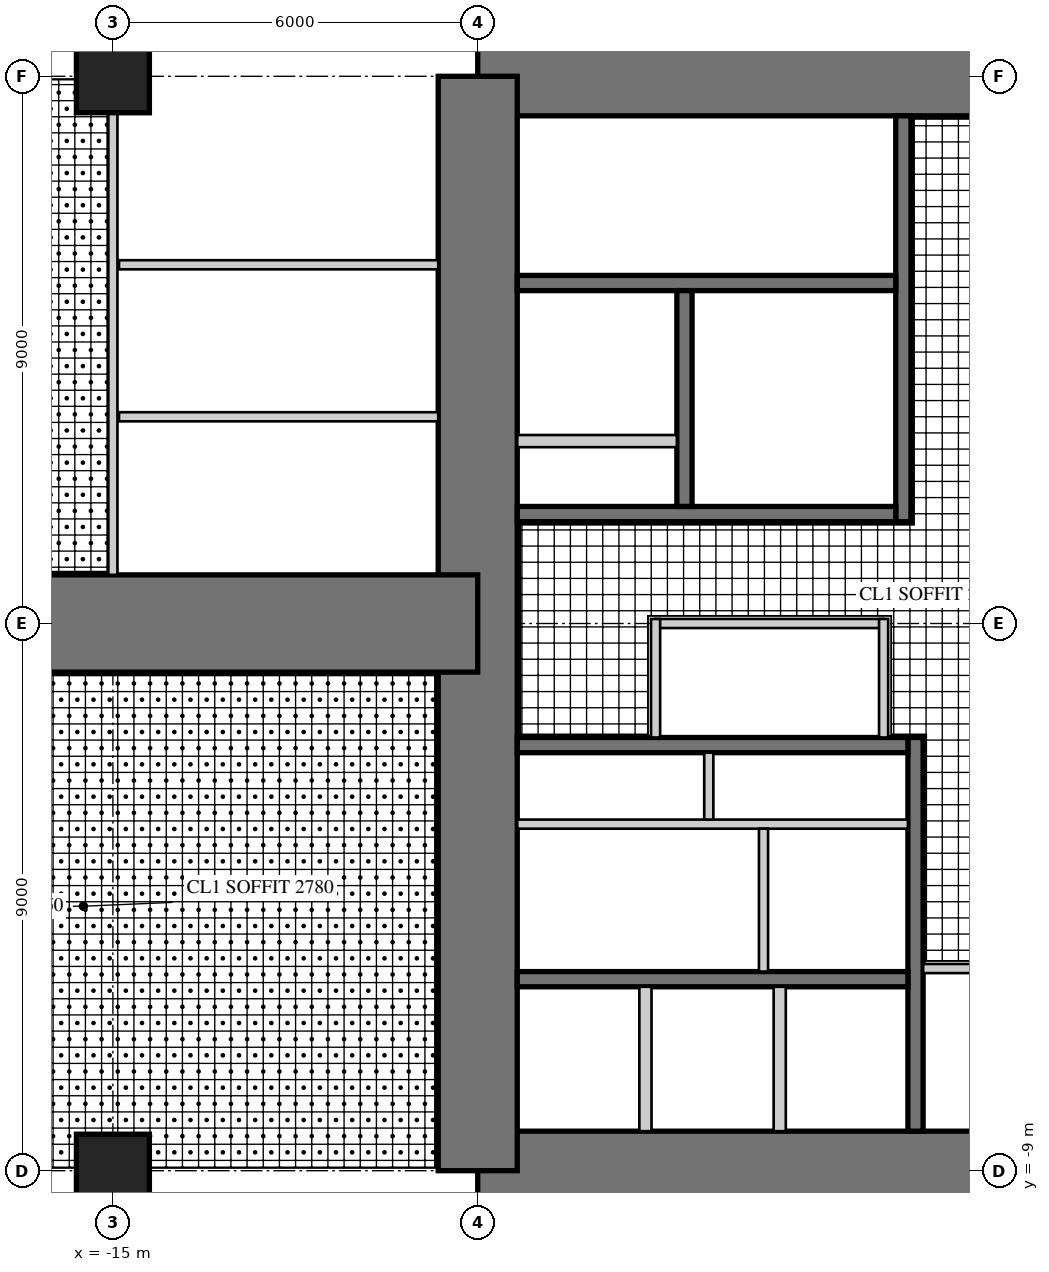
"""IFC4 building model, lengths in metres.
Left out: names, types, materials, properties, quantities, classifications, styles, units other than length and angle.
Written with IfcOpenShell. Run it as: python <this file> out.ifc"""

import sys

from ifc_helpers import new_model, si_unit, direction, frame, frame_2d, origin, origin_2d, place, context, subcontext, project, spatial, rectangle, extrude, element, fill, save


model = new_model("IFC4")
c1 = context("Model", 3, precision=1e-05, world=origin(), true_north=direction((0.0, 1.0)))
c2 = subcontext(c1, "Body", "Model", "MODEL_VIEW")
j1 = project(units=[si_unit("LENGTHUNIT", "METRE"), si_unit("PLANEANGLEUNIT", "RADIAN")], contexts=[c1])
p1 = place(None, origin())
s1 = spatial("IfcSite", under=j1, at=p1, CompositionType="ELEMENT")
p2 = place(p1, origin())
s2 = spatial("IfcBuilding", under=s1, at=p2, CompositionType="ELEMENT")
p3 = place(p2, frame((0.0, 0.0, 27.5)))
s3 = spatial("IfcBuildingStorey", under=s2, at=p3, CompositionType="ELEMENT", Elevation=27.5)
p4 = place(p3, frame((9.0, 9.0, 0.0), z_axis=(0.0, 0.0, 1.0), x_axis=(-1.0, 0.0, 0.0)))
e1 = element("IfcWall", 1, at=p4, inside=s3, PredefinedType="SHEAR", context=c2, shape_type="SweptSolid", body=[
    extrude(rectangle(XDim=18.0, YDim=1.3, at=frame_2d((9.0, 0.0))), origin(), (0.0, 0.0, 1.0), 4.0),
])
p5 = place(p4, frame((9.8, 0.0, 0.0)))
e2 = element("IfcOpeningElement", 2, at=p5, cuts=e1, PredefinedType="OPENING", context=c2, shape_type="SweptSolid", body=[
    extrude(rectangle(XDim=1.0, YDim=2.4, at=frame_2d((0.5, 1.2))), frame((0.0, 0.66, 0.0), z_axis=(0.0, -1.0, 0.0), x_axis=(1.0, 0.0, 0.0)), (0.0, 0.0, 1.0), 1.32),
])
p6 = place(p3, frame((-9.0, -9.0, 0.0), z_axis=(0.0, 0.0, 1.0), x_axis=(1.0, 0.0, 0.0)))
e3 = element("IfcWall", 3, at=p6, inside=s3, PredefinedType="SHEAR", context=c2, shape_type="SweptSolid", body=[
    extrude(rectangle(XDim=18.0, YDim=1.3, at=frame_2d((9.0, 0.0))), origin(), (0.0, 0.0, 1.0), 4.0),
])
p7 = place(p6, frame((9.8, 0.0, 0.0)))
e4 = element("IfcOpeningElement", 4, at=p7, cuts=e3, PredefinedType="OPENING", context=c2, shape_type="SweptSolid", body=[
    extrude(rectangle(XDim=1.0, YDim=2.4, at=frame_2d((0.5, 1.2))), frame((0.0, 0.66, 0.0), z_axis=(0.0, -1.0, 0.0), x_axis=(1.0, 0.0, 0.0)), (0.0, 0.0, 1.0), 1.32),
])
p8 = place(p3, frame((-9.0, 9.0, 0.0), z_axis=(0.0, 0.0, 1.0), x_axis=(0.0, -1.0, 0.0)))
e5 = element("IfcWall", 5, at=p8, inside=s3, PredefinedType="SHEAR", context=c2, shape_type="SweptSolid", body=[
    extrude(rectangle(XDim=18.0, YDim=1.3, at=frame_2d((9.0, 0.0))), origin(), (0.0, 0.0, 1.0), 4.0),
])
p9 = place(p8, frame((9.8, 0.0, 0.0)))
e6 = element("IfcOpeningElement", 6, at=p9, cuts=e5, PredefinedType="OPENING", context=c2, shape_type="SweptSolid", body=[
    extrude(rectangle(XDim=1.0, YDim=2.4, at=frame_2d((0.5, 1.2))), frame((0.0, 0.66, 0.0), z_axis=(0.0, -1.0, 0.0), x_axis=(1.0, 0.0, 0.0)), (0.0, 0.0, 1.0), 1.32),
])
p10 = place(p3, frame((-2.0, 1.675, 0.0), z_axis=(0.0, 0.0, 1.0), x_axis=(0.0, 1.0, 0.0)))
e7 = element("IfcWall", 7, at=p10, inside=s3, PredefinedType="SHEAR", context=c2, shape_type="SweptSolid", body=[
    extrude(rectangle(XDim=6.675, YDim=0.25, at=frame_2d((3.337, 0.0))), origin(), (0.0, 0.0, 1.0), 4.0),
])
p11 = place(p10, frame((0.725, 0.0, 0.0)))
e8 = element("IfcOpeningElement", 8, at=p11, cuts=e7, PredefinedType="OPENING", context=c2, shape_type="SweptSolid", body=[
    extrude(rectangle(XDim=1.0, YDim=2.1, at=frame_2d((0.5, 1.05))), frame((0.0, 0.135, 0.0), z_axis=(0.0, -1.0, 0.0), x_axis=(1.0, 0.0, 0.0)), (0.0, 0.0, 1.0), 0.27),
])
p12 = place(p3, frame((-2.125, 1.8, 0.0), z_axis=(0.0, 0.0, 1.0), x_axis=(-1.0, 0.0, 0.0)))
e9 = element("IfcWall", 9, at=p12, inside=s3, PredefinedType="SHEAR", context=c2, shape_type="SweptSolid", body=[
    extrude(rectangle(XDim=6.225, YDim=0.25, at=frame_2d((3.113, 0.0))), origin(), (0.0, 0.0, 1.0), 4.0),
])
p13 = place(p3, frame((-2.125, 5.6, 0.0), z_axis=(0.0, 0.0, 1.0), x_axis=(-1.0, 0.0, 0.0)))
e10 = element("IfcWall", 10, at=p13, inside=s3, PredefinedType="SHEAR", context=c2, shape_type="SweptSolid", body=[
    extrude(rectangle(XDim=6.225, YDim=0.25, at=frame_2d((3.113, 0.0))), origin(), (0.0, 0.0, 1.0), 4.0),
])
p14 = place(p13, frame((0.175, 0.0, 0.0)))
e11 = element("IfcOpeningElement", 11, at=p14, cuts=e10, PredefinedType="OPENING", context=c2, shape_type="SweptSolid", body=[
    extrude(rectangle(XDim=1.0, YDim=2.1, at=frame_2d((0.5, 1.05))), frame((0.0, 0.135, 0.0), z_axis=(0.0, -1.0, 0.0), x_axis=(1.0, 0.0, 0.0)), (0.0, 0.0, 1.0), 0.27),
])
p15 = place(p3, frame((-5.6, 1.925, 0.0), z_axis=(0.0, 0.0, 1.0), x_axis=(0.0, 1.0, 0.0)))
e12 = element("IfcWall", 12, at=p15, inside=s3, PredefinedType="SHEAR", context=c2, shape_type="SweptSolid", body=[
    extrude(rectangle(XDim=3.55, YDim=0.25, at=frame_2d((1.775, 0.0))), origin(), (0.0, 0.0, 1.0), 4.0),
])
p16 = place(p15, frame((1.525, 0.0, 0.0)))
e13 = element("IfcOpeningElement", 13, at=p16, cuts=e12, PredefinedType="OPENING", context=c2, shape_type="SweptSolid", body=[
    extrude(rectangle(XDim=1.1, YDim=2.2, at=frame_2d((0.55, 1.1))), frame((0.0, 0.135, 0.0), z_axis=(0.0, -1.0, 0.0), x_axis=(1.0, 0.0, 0.0)), (0.0, 0.0, 1.0), 0.27),
])
p17 = place(p15, frame((0.075, 0.0, 0.0)))
e14 = element("IfcOpeningElement", 14, at=p17, cuts=e12, PredefinedType="OPENING", context=c2, shape_type="SweptSolid", body=[
    extrude(rectangle(XDim=0.8, YDim=2.1, at=frame_2d((0.4, 1.05))), frame((0.0, 0.135, 0.0), z_axis=(0.0, -1.0, 0.0), x_axis=(1.0, 0.0, 0.0)), (0.0, 0.0, 1.0), 0.27),
])
p18 = place(p3, frame((-5.725, 3.0, 0.0), z_axis=(0.0, 0.0, 1.0), x_axis=(-1.0, 0.0, 0.0)))
e15 = element("IfcWall", 15, at=p18, inside=s3, PredefinedType="PARTITIONING", context=c2, shape_type="SweptSolid", body=[
    extrude(rectangle(XDim=2.625, YDim=0.2, at=frame_2d((1.312, 0.0))), origin(), (0.0, 0.0, 1.0), 4.0),
])
p19 = place(p3, frame((-1.8, -1.875, 0.0), z_axis=(0.0, 0.0, 1.0), x_axis=(0.0, -1.0, 0.0)))
e16 = element("IfcWall", 16, at=p19, inside=s3, PredefinedType="SHEAR", context=c2, shape_type="SweptSolid", body=[
    extrude(rectangle(XDim=6.475, YDim=0.25, at=frame_2d((3.238, 0.0))), origin(), (0.0, 0.0, 1.0), 4.0),
])
p20 = place(p19, frame((1.875, 0.0, 0.0)))
e17 = element("IfcOpeningElement", 17, at=p20, cuts=e16, PredefinedType="OPENING", context=c2, shape_type="SweptSolid", body=[
    extrude(rectangle(XDim=1.6, YDim=2.4, at=frame_2d((0.8, 1.2))), frame((0.0, 0.135, 0.0), z_axis=(0.0, -1.0, 0.0), x_axis=(1.0, 0.0, 0.0)), (0.0, 0.0, 1.0), 0.27),
])
for number, where, z_axis, x_axis in (
    (18, (-1.925, -2.0, 0.0), (0.0, 0.0, 1.0), (-1.0, 0.0, 0.0)),
    (19, (-1.925, -5.85, 0.0), (0.0, 0.0, 1.0), (-1.0, 0.0, 0.0)),
):
    element("IfcWall", number, at=place(p3, frame(where, z_axis=z_axis, x_axis=x_axis)), inside=s3, PredefinedType="SHEAR", context=c2, shape_type="SweptSolid", body=[
        extrude(rectangle(XDim=6.425, YDim=0.25, at=frame_2d((3.212, 0.0))), origin(), (0.0, 0.0, 1.0), 4.0),
    ])
p21 = place(p3, frame((-1.925, -3.3, 0.0), z_axis=(0.0, 0.0, 1.0), x_axis=(-1.0, 0.0, 0.0)))
e20 = element("IfcWall", 20, at=p21, inside=s3, PredefinedType="PARTITIONING", context=c2, shape_type="SweptSolid", body=[
    extrude(rectangle(XDim=6.425, YDim=0.15, at=frame_2d((3.212, 0.0))), origin(), (0.0, 0.0, 1.0), 4.0),
])
p22 = place(p21, frame((0.075, 0.0, 0.0)))
e21 = element("IfcOpeningElement", 21, at=p22, cuts=e20, PredefinedType="OPENING", context=c2, shape_type="SweptSolid", body=[
    extrude(rectangle(XDim=0.8, YDim=2.1, at=frame_2d((0.4, 1.05))), frame((0.0, 0.085, 0.0), z_axis=(0.0, -1.0, 0.0), x_axis=(1.0, 0.0, 0.0)), (0.0, 0.0, 1.0), 0.17),
])
p23 = place(p21, frame((3.675, 0.0, 0.0)))
e22 = element("IfcOpeningElement", 22, at=p23, cuts=e20, PredefinedType="OPENING", context=c2, shape_type="SweptSolid", body=[
    extrude(rectangle(XDim=0.8, YDim=2.1, at=frame_2d((0.4, 1.05))), frame((0.0, 0.085, 0.0), z_axis=(0.0, -1.0, 0.0), x_axis=(1.0, 0.0, 0.0)), (0.0, 0.0, 1.0), 0.17),
])
p24 = place(p3, frame((-5.2, -2.125, 0.0), z_axis=(0.0, 0.0, 1.0), x_axis=(0.0, -1.0, 0.0)))
e23 = element("IfcWall", 23, at=p24, inside=s3, PredefinedType="PARTITIONING", context=c2, shape_type="SweptSolid", body=[
    extrude(rectangle(XDim=1.1, YDim=0.15, at=frame_2d((0.55, 0.0))), origin(), (0.0, 0.0, 1.0), 4.0),
])
for number, where, z_axis, x_axis in (
    (24, (-4.033, -5.975, 0.0), (0.0, 0.0, 1.0), (0.0, -1.0, 0.0)),
    (25, (-6.242, -5.975, 0.0), (0.0, 0.0, 1.0), (0.0, -1.0, 0.0)),
):
    element("IfcWall", number, at=place(p3, frame(where, z_axis=z_axis, x_axis=x_axis)), inside=s3, PredefinedType="PARTITIONING", context=c2, shape_type="SweptSolid", body=[
        extrude(rectangle(XDim=2.375, YDim=0.2, at=frame_2d((1.188, 0.0))), origin(), (0.0, 0.0, 1.0), 4.0),
    ])
p25 = place(p3, frame((-9.0, 0.0, 0.0), z_axis=(0.0, 0.0, 1.0), x_axis=(-1.0, 0.0, 0.0)))
e26 = element("IfcWall", 26, at=p25, inside=s3, PredefinedType="SHEAR", context=c2, shape_type="SweptSolid", body=[
    extrude(rectangle(XDim=18.0, YDim=1.6, at=frame_2d((9.0, 0.0))), origin(), (0.0, 0.0, 1.0), 4.0),
])
p26 = place(p25, frame((9.9, 0.0, 0.0)))
e27 = element("IfcOpeningElement", 27, at=p26, cuts=e26, PredefinedType="OPENING", context=c2, shape_type="SweptSolid", body=[
    extrude(rectangle(XDim=1.0, YDim=2.2, at=frame_2d((0.5, 1.1))), frame((0.0, 0.81, 0.0), z_axis=(0.0, -1.0, 0.0), x_axis=(1.0, 0.0, 0.0)), (0.0, 0.0, 1.0), 1.62),
])
for number, where, z_axis, x_axis in (
    (28, (-15.0, 9.0, 0.0), (0.0, 0.0, 1.0), (1.0, 0.0, 0.0)),
    (29, (-15.0, -9.0, 0.0), (0.0, 0.0, 1.0), (1.0, 0.0, 0.0)),
):
    element("IfcColumn", number, at=place(p3, frame(where, z_axis=z_axis, x_axis=x_axis)), inside=s3, PredefinedType="COLUMN", context=c2, shape_type="SweptSolid", body=[
        extrude(rectangle(XDim=1.2, YDim=1.2, at=origin_2d()), origin(), (0.0, 0.0, 1.0), 4.0),
    ])
p27 = place(p3, frame((-2.325, 0.0, 0.0), z_axis=(0.0, 0.0, 1.0), x_axis=(-1.0, 0.0, 0.0)))
e30 = element("IfcWall", 30, at=p27, inside=s3, PredefinedType="PARTITIONING", context=c2, shape_type="SweptSolid", body=[
    extrude(rectangle(XDim=3.75, YDim=0.15, at=frame_2d((1.875, 0.0))), origin(), (0.0, 0.0, 1.0), 3.8),
])
p28 = place(p27, frame((0.4, 0.0, 0.0)))
e31 = element("IfcOpeningElement", 31, at=p28, cuts=e30, PredefinedType="OPENING", context=c2, shape_type="SweptSolid", body=[
    extrude(rectangle(XDim=1.0, YDim=2.1, at=frame_2d((0.5, 1.05))), frame((0.0, 0.085, 0.0), z_axis=(0.0, -1.0, 0.0), x_axis=(1.0, 0.0, 0.0)), (0.0, 0.0, 1.0), 0.17),
])
for number, where, z_axis, x_axis in (
    (32, (-2.325, -1.875, 0.0), (0.0, 0.0, 1.0), (0.0, 1.0, 0.0)),
    (33, (-6.075, 0.075, 0.0), (0.0, 0.0, 1.0), (0.0, -1.0, 0.0)),
):
    element("IfcWall", number, at=place(p3, frame(where, z_axis=z_axis, x_axis=x_axis)), inside=s3, PredefinedType="PARTITIONING", context=c2, shape_type="SweptSolid", body=[
        extrude(rectangle(XDim=1.95, YDim=0.15, at=frame_2d((0.975, 0.0))), origin(), (0.0, 0.0, 1.0), 3.8),
    ])
p29 = place(p3, frame((-1.675, -5.675, 0.0), z_axis=(0.0, 0.0, 1.0), x_axis=(1.0, 0.0, 0.0)))
e34 = element("IfcWall", 34, at=p29, inside=s3, PredefinedType="PARTITIONING", context=c2, shape_type="SweptSolid", body=[
    extrude(rectangle(XDim=1.75, YDim=0.15, at=frame_2d((0.875, 0.0))), origin(), (0.0, 0.0, 1.0), 3.8),
])
p30 = place(p3, frame((-4.3, -3.375, 0.0), z_axis=(0.0, 0.0, 1.0), x_axis=(0.0, -1.0, 0.0)))
e35 = element("IfcWall", 35, at=p30, inside=s3, PredefinedType="PARTITIONING", context=c2, shape_type="SweptSolid", body=[
    extrude(rectangle(XDim=2.35, YDim=0.15, at=frame_2d((1.175, 0.0))), origin(), (0.0, 0.0, 1.0), 3.8),
])
p31 = place(p30, frame((0.45, 0.0, 0.0)))
e36 = element("IfcOpeningElement", 36, at=p31, cuts=e35, PredefinedType="OPENING", context=c2, shape_type="SweptSolid", body=[
    extrude(rectangle(XDim=1.0, YDim=2.1, at=frame_2d((0.5, 1.05))), frame((0.0, 0.085, 0.0), z_axis=(0.0, -1.0, 0.0), x_axis=(1.0, 0.0, 0.0)), (0.0, 0.0, 1.0), 0.17),
])
p32 = place(p3, frame((-15.0, 8.4, 0.0), z_axis=(0.0, 0.0, 1.0), x_axis=(0.0, -1.0, 0.0)))
e37 = element("IfcWall", 37, at=p32, inside=s3, PredefinedType="PARTITIONING", context=c2, shape_type="SweptSolid", body=[
    extrude(rectangle(XDim=7.6, YDim=0.15, at=frame_2d((3.8, 0.0))), origin(), (0.0, 0.0, 1.0), 2.95),
])
p33 = place(p32, frame((0.75, 0.0, 0.0)))
e38 = element("IfcOpeningElement", 38, at=p33, cuts=e37, PredefinedType="OPENING", context=c2, shape_type="SweptSolid", body=[
    extrude(rectangle(XDim=1.0, YDim=2.1, at=frame_2d((0.5, 1.05))), frame((0.0, 0.085, 0.0), z_axis=(0.0, -1.0, 0.0), x_axis=(1.0, 0.0, 0.0)), (0.0, 0.0, 1.0), 0.17),
])
p34 = place(p32, frame((3.25, 0.0, 0.0)))
e39 = element("IfcOpeningElement", 39, at=p34, cuts=e37, PredefinedType="OPENING", context=c2, shape_type="SweptSolid", body=[
    extrude(rectangle(XDim=1.0, YDim=2.1, at=frame_2d((0.5, 1.05))), frame((0.0, 0.085, 0.0), z_axis=(0.0, -1.0, 0.0), x_axis=(1.0, 0.0, 0.0)), (0.0, 0.0, 1.0), 0.17),
])
p35 = place(p32, frame((5.8, 0.0, 0.0)))
e40 = element("IfcOpeningElement", 40, at=p35, cuts=e37, PredefinedType="OPENING", context=c2, shape_type="SweptSolid", body=[
    extrude(rectangle(XDim=1.0, YDim=2.1, at=frame_2d((0.5, 1.05))), frame((0.0, 0.085, 0.0), z_axis=(0.0, -1.0, 0.0), x_axis=(1.0, 0.0, 0.0)), (0.0, 0.0, 1.0), 0.17),
])
p36 = place(p3, frame((-9.65, 3.4, 0.0), z_axis=(0.0, 0.0, 1.0), x_axis=(-1.0, 0.0, 0.0)))
e41 = element("IfcWall", 41, at=p36, inside=s3, PredefinedType="PARTITIONING", context=c2, shape_type="SweptSolid", body=[
    extrude(rectangle(XDim=5.25, YDim=0.15, at=frame_2d((2.625, 0.0))), origin(), (0.0, 0.0, 1.0), 3.8),
])
p37 = place(p3, frame((-9.65, 5.9, 0.0), z_axis=(0.0, 0.0, 1.0), x_axis=(-1.0, 0.0, 0.0)))
e42 = element("IfcWall", 42, at=p37, inside=s3, PredefinedType="PARTITIONING", context=c2, shape_type="SweptSolid", body=[
    extrude(rectangle(XDim=5.25, YDim=0.15, at=frame_2d((2.625, 0.0))), origin(), (0.0, 0.0, 1.0), 3.0),
])
p38 = place(p28, origin())
e43 = element("IfcDoor", 43, at=p38, inside=s3, OperationType="SINGLE_SWING_LEFT", PredefinedType="DOOR", context=c2, shape_type="SweptSolid", body=[
    extrude(rectangle(XDim=1.0, YDim=2.1, at=frame_2d((0.5, 1.05))), frame((0.0, 0.025, 0.0), z_axis=(0.0, -1.0, 0.0), x_axis=(1.0, 0.0, 0.0)), (0.0, 0.0, 1.0), 0.05),
])
fill(e31, e43)
p39 = place(p31, origin())
e44 = element("IfcDoor", 44, at=p39, inside=s3, OperationType="SINGLE_SWING_LEFT", PredefinedType="DOOR", context=c2, shape_type="SweptSolid", body=[
    extrude(rectangle(XDim=1.0, YDim=2.1, at=frame_2d((0.5, 1.05))), frame((0.0, 0.025, 0.0), z_axis=(0.0, -1.0, 0.0), x_axis=(1.0, 0.0, 0.0)), (0.0, 0.0, 1.0), 0.05),
])
fill(e36, e44)
p40 = place(p33, origin())
e45 = element("IfcDoor", 45, at=p40, inside=s3, OperationType="SINGLE_SWING_RIGHT", PredefinedType="DOOR", context=c2, shape_type="SweptSolid", body=[
    extrude(rectangle(XDim=1.0, YDim=2.1, at=frame_2d((0.5, 1.05))), frame((0.0, 0.025, 0.0), z_axis=(0.0, -1.0, 0.0), x_axis=(1.0, 0.0, 0.0)), (0.0, 0.0, 1.0), 0.05),
])
fill(e38, e45)
p41 = place(p34, origin())
e46 = element("IfcDoor", 46, at=p41, inside=s3, OperationType="SINGLE_SWING_LEFT", PredefinedType="DOOR", context=c2, shape_type="SweptSolid", body=[
    extrude(rectangle(XDim=1.0, YDim=2.1, at=frame_2d((0.5, 1.05))), frame((0.0, 0.025, 0.0), z_axis=(0.0, -1.0, 0.0), x_axis=(1.0, 0.0, 0.0)), (0.0, 0.0, 1.0), 0.05),
])
fill(e39, e46)
p42 = place(p35, origin())
e47 = element("IfcDoor", 47, at=p42, inside=s3, OperationType="SINGLE_SWING_LEFT", PredefinedType="DOOR", context=c2, shape_type="SweptSolid", body=[
    extrude(rectangle(XDim=1.0, YDim=2.1, at=frame_2d((0.5, 1.05))), frame((0.0, 0.025, 0.0), z_axis=(0.0, -1.0, 0.0), x_axis=(1.0, 0.0, 0.0)), (0.0, 0.0, 1.0), 0.05),
])
fill(e40, e47)
p43 = place(p5, frame((1.0, 0.0, 0.0), z_axis=(0.0, 0.0, 1.0), x_axis=(-1.0, 0.0, 0.0)))
e48 = element("IfcDoor", 48, at=p43, inside=s3, OperationType="SINGLE_SWING_RIGHT", PredefinedType="DOOR", context=c2, shape_type="SweptSolid", body=[
    extrude(rectangle(XDim=1.0, YDim=2.4, at=frame_2d((0.5, 1.2))), frame((0.0, -0.005, 0.0), z_axis=(0.0, -1.0, 0.0), x_axis=(1.0, 0.0, 0.0)), (0.0, 0.0, 1.0), 0.05),
])
fill(e2, e48)
p44 = place(p9, frame((1.0, 0.0, 0.0), z_axis=(0.0, 0.0, 1.0), x_axis=(-1.0, 0.0, 0.0)))
e49 = element("IfcDoor", 49, at=p44, inside=s3, OperationType="SINGLE_SWING_RIGHT", PredefinedType="DOOR", context=c2, shape_type="SweptSolid", body=[
    extrude(rectangle(XDim=1.0, YDim=2.4, at=frame_2d((0.5, 1.2))), frame((0.0, -0.005, 0.0), z_axis=(0.0, -1.0, 0.0), x_axis=(1.0, 0.0, 0.0)), (0.0, 0.0, 1.0), 0.05),
])
fill(e6, e49)
p45 = place(p11, origin())
e50 = element("IfcDoor", 50, at=p45, inside=s3, OperationType="SINGLE_SWING_LEFT", PredefinedType="DOOR", context=c2, shape_type="SweptSolid", body=[
    extrude(rectangle(XDim=1.0, YDim=2.1, at=frame_2d((0.5, 1.05))), frame((0.0, 0.025, 0.0), z_axis=(0.0, -1.0, 0.0), x_axis=(1.0, 0.0, 0.0)), (0.0, 0.0, 1.0), 0.05),
])
fill(e8, e50)
p46 = place(p14, frame((1.0, 0.0, 0.0), z_axis=(0.0, 0.0, 1.0), x_axis=(-1.0, 0.0, 0.0)))
e51 = element("IfcDoor", 51, at=p46, inside=s3, OperationType="SINGLE_SWING_RIGHT", PredefinedType="DOOR", context=c2, shape_type="SweptSolid", body=[
    extrude(rectangle(XDim=1.0, YDim=2.1, at=frame_2d((0.5, 1.05))), frame((0.0, 0.025, 0.0), z_axis=(0.0, -1.0, 0.0), x_axis=(1.0, 0.0, 0.0)), (0.0, 0.0, 1.0), 0.05),
])
fill(e11, e51)
p47 = place(p16, origin())
e52 = element("IfcDoor", 52, at=p47, inside=s3, OperationType="DOUBLE_DOOR_SLIDING", PredefinedType="DOOR", context=c2, shape_type="SweptSolid", body=[
    extrude(rectangle(XDim=1.1, YDim=2.2, at=frame_2d((0.55, 1.1))), frame((0.0, 0.025, 0.0), z_axis=(0.0, -1.0, 0.0), x_axis=(1.0, 0.0, 0.0)), (0.0, 0.0, 1.0), 0.05),
])
fill(e13, e52)
p48 = place(p17, origin())
e53 = element("IfcDoor", 53, at=p48, inside=s3, OperationType="SINGLE_SWING_LEFT", PredefinedType="DOOR", context=c2, shape_type="SweptSolid", body=[
    extrude(rectangle(XDim=0.8, YDim=2.1, at=frame_2d((0.4, 1.05))), frame((0.0, 0.025, 0.0), z_axis=(0.0, -1.0, 0.0), x_axis=(1.0, 0.0, 0.0)), (0.0, 0.0, 1.0), 0.05),
])
fill(e14, e53)
p49 = place(p20, frame((1.6, 0.0, 0.0), z_axis=(0.0, 0.0, 1.0), x_axis=(-1.0, 0.0, 0.0)))
e54 = element("IfcDoor", 54, at=p49, inside=s3, OperationType="DOUBLE_DOOR_SINGLE_SWING", PredefinedType="DOOR", context=c2, shape_type="SweptSolid", body=[
    extrude(rectangle(XDim=1.6, YDim=2.4, at=frame_2d((0.8, 1.2))), frame((0.0, 0.025, 0.0), z_axis=(0.0, -1.0, 0.0), x_axis=(1.0, 0.0, 0.0)), (0.0, 0.0, 1.0), 0.05),
])
fill(e17, e54)
p50 = place(p22, frame((0.8, 0.0, 0.0), z_axis=(0.0, 0.0, 1.0), x_axis=(-1.0, 0.0, 0.0)))
e55 = element("IfcDoor", 55, at=p50, inside=s3, OperationType="SINGLE_SWING_RIGHT", PredefinedType="DOOR", context=c2, shape_type="SweptSolid", body=[
    extrude(rectangle(XDim=0.8, YDim=2.1, at=frame_2d((0.4, 1.05))), frame((0.0, 0.025, 0.0), z_axis=(0.0, -1.0, 0.0), x_axis=(1.0, 0.0, 0.0)), (0.0, 0.0, 1.0), 0.05),
])
fill(e21, e55)
p51 = place(p23, frame((0.8, 0.0, 0.0), z_axis=(0.0, 0.0, 1.0), x_axis=(-1.0, 0.0, 0.0)))
e56 = element("IfcDoor", 56, at=p51, inside=s3, OperationType="SINGLE_SWING_RIGHT", PredefinedType="DOOR", context=c2, shape_type="SweptSolid", body=[
    extrude(rectangle(XDim=0.8, YDim=2.1, at=frame_2d((0.4, 1.05))), frame((0.0, 0.025, 0.0), z_axis=(0.0, -1.0, 0.0), x_axis=(1.0, 0.0, 0.0)), (0.0, 0.0, 1.0), 0.05),
])
fill(e22, e56)
save(model, sys.argv[1])
